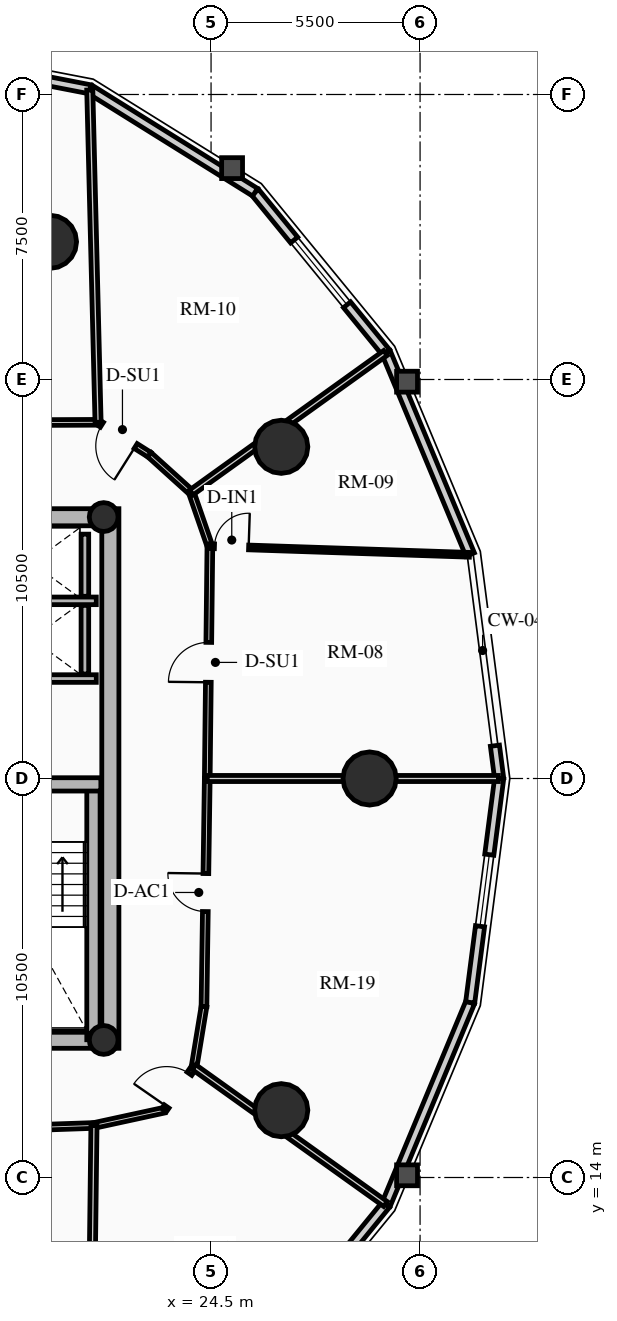
"""IFC4 building model, lengths in metres.
Left out: names, types, materials, properties, quantities, classifications, styles, units other than length and angle.
Written with IfcOpenShell. Run it as: python <this file> out.ifc"""

import sys

from ifc_helpers import new_model, si_unit, direction, frame, frame_2d, origin, origin_2d, place, context, subcontext, project, spatial, rectangle, circle, hollow_circle, extrude, source, transform, mapped, element, fill, save


model = new_model("IFC4")
c1 = context("Model", 3, precision=1e-05, world=origin(), true_north=direction((0.0, 1.0)))
c2 = subcontext(c1, "Body", "Model", "MODEL_VIEW")
j1 = project(units=[si_unit("LENGTHUNIT", "METRE"), si_unit("PLANEANGLEUNIT", "RADIAN")], contexts=[c1])
p1 = place(None, origin())
s1 = spatial("IfcSite", under=j1, at=p1, CompositionType="ELEMENT")
p2 = place(p1, origin())
s2 = spatial("IfcBuilding", under=s1, at=p2, CompositionType="ELEMENT")
p3 = place(p2, frame((0.0, 0.0, 81.79)))
s3 = spatial("IfcBuildingStorey", under=s2, at=p3, CompositionType="ELEMENT", Elevation=81.79)
p4 = place(p3, frame((21.85, 17.4, 0.0), z_axis=(0.0, 0.0, 1.0), x_axis=(0.0, 1.0, 0.0)))
e1 = element("IfcWall", 1, at=p4, inside=s3, PredefinedType="SHEAR", context=c2, shape_type="SweptSolid", body=[
    extrude(rectangle(XDim=14.2, YDim=0.45, at=frame_2d((7.1, 0.0))), origin(), (0.0, 0.0, 1.0), 2.91),
])
p5 = place(p3, frame((11.15, 17.625, 0.0), z_axis=(0.0, 0.0, 1.0), x_axis=(1.0, 0.0, 0.0)))
e2 = element("IfcWall", 2, at=p5, inside=s3, PredefinedType="SHEAR", context=c2, shape_type="SweptSolid", body=[
    extrude(rectangle(XDim=10.7, YDim=0.45, at=frame_2d((5.35, 0.0))), origin(), (0.0, 0.0, 1.0), 2.91),
])
m1 = source(origin(), c2, "Body", "SweptSolid", [
    extrude(rectangle(XDim=1.5, YDim=2.02, at=frame_2d((0.75, 1.01))), frame((0.0, 0.235, 0.0), z_axis=(0.0, -1.0, 0.0), x_axis=(1.0, 0.0, 0.0)), (0.0, 0.0, 1.0), 0.47),
])
p6 = place(p5, frame((5.45, 0.0, 0.0)))
e3 = element("IfcOpeningElement", 3, at=p6, cuts=e2, PredefinedType="OPENING", context=c2, shape_type="MappedRepresentation", body=[
    mapped(m1, transform((0.0, 0.0, 0.0), x_axis=(1.0, 0.0, 0.0), y_axis=(0.0, 1.0, 0.0), z_axis=(0.0, 0.0, 1.0), scale=1.0)),
])
p7 = place(p3, frame((11.15, 31.375, 0.0), z_axis=(0.0, 0.0, 1.0), x_axis=(1.0, 0.0, 0.0)))
e4 = element("IfcWall", 4, at=p7, inside=s3, PredefinedType="SHEAR", context=c2, shape_type="SweptSolid", body=[
    extrude(rectangle(XDim=10.7, YDim=0.45, at=frame_2d((5.35, 0.0))), origin(), (0.0, 0.0, 1.0), 2.91),
])
p8 = place(p7, frame((4.6, 0.0, 0.0)))
e5 = element("IfcOpeningElement", 5, at=p8, cuts=e4, PredefinedType="OPENING", context=c2, shape_type="MappedRepresentation", body=[
    mapped(m1, transform((0.0, 0.0, 0.0), x_axis=(1.0, 0.0, 0.0), y_axis=(0.0, 1.0, 0.0), z_axis=(0.0, 0.0, 1.0), scale=1.0)),
])
p9 = place(p3, frame((21.405, 17.625, 0.0), z_axis=(0.0, 0.0, 1.0), x_axis=(0.0, 1.0, 0.0)))
e6 = element("IfcWall", 6, at=p9, inside=s3, PredefinedType="SHEAR", context=c2, shape_type="SweptSolid", body=[
    extrude(rectangle(XDim=6.72, YDim=0.35, at=frame_2d((3.36, 0.0))), origin(), (0.0, 0.0, 1.0), 2.91),
])
p10 = place(p3, frame((18.315, 24.345, 0.0), z_axis=(0.0, 0.0, 1.0), x_axis=(1.0, 0.0, 0.0)))
e7 = element("IfcWall", 7, at=p10, inside=s3, PredefinedType="SHEAR", context=c2, shape_type="SweptSolid", body=[
    extrude(rectangle(XDim=3.285, YDim=0.35, at=frame_2d((1.643, 0.0))), origin(), (0.0, 0.0, 1.0), 2.91),
])
for number, where, z_axis, x_axis in (
    (8, (21.675, 17.62, 0.0), (0.0, 0.0, 1.0), (1.0, 0.0, 0.0)),
    (9, (21.675, 31.38, 0.0), (0.0, 0.0, 1.0), (1.0, 0.0, 0.0)),
):
    element("IfcColumn", number, at=place(p3, frame(where, z_axis=z_axis, x_axis=x_axis)), inside=s3, PredefinedType="COLUMN", context=c2, shape_type="SweptSolid", body=[
        extrude(hollow_circle(Radius=0.38, WallThickness=0.032, at=origin_2d()), origin(), (0.0, 0.0, 1.0), 2.91),
    ])
for number, where, z_axis, x_axis in (
    (10, (28.672, 24.5, 0.0), (0.0, 0.0, 1.0), (1.0, 0.0, 0.0)),
    (11, (26.347, 33.229, 0.0), (0.0, 0.0, 1.0), (1.0, 0.0, 0.0)),
    (12, (20.261, 38.623, 0.0), (0.0, 0.0, 1.0), (1.0, 0.0, 0.0)),
    (13, (26.347, 15.771, 0.0), (0.0, 0.0, 1.0), (1.0, 0.0, 0.0)),
):
    element("IfcColumn", number, at=place(p3, frame(where, z_axis=z_axis, x_axis=x_axis)), inside=s3, PredefinedType="USERDEFINED", context=c2, shape_type="SweptSolid", body=[
        extrude(circle(Radius=0.7, at=origin_2d()), origin(), (0.0, 0.0, 1.0), 2.91),
    ])
p11 = place(p3, frame((31.969, 25.363, 0.0), z_axis=(0.0, 0.0, 1.0), x_axis=(0.128523364007, -0.991706481225, 0.0)))
e14 = element("IfcWall", 14, at=p11, inside=s3, PredefinedType="SOLIDWALL", context=c2, shape_type="SweptSolid", body=[
    extrude(rectangle(XDim=0.87, YDim=0.24, at=frame_2d((0.435, 0.0))), origin(), (0.0, 0.0, 1.0), 2.655),
])
p12 = place(p3, frame((29.105, 35.709, 0.0), z_axis=(0.0, 0.0, 1.0), x_axis=(0.384344417632, -0.923189779317, 0.0)))
e15 = element("IfcWall", 15, at=p12, inside=s3, PredefinedType="SOLIDWALL", context=c2, shape_type="SweptSolid", body=[
    extrude(rectangle(XDim=5.758, YDim=0.24, at=frame_2d((2.879, 0.0))), origin(), (0.0, 0.0, 1.0), 2.179),
])
p13 = place(p3, frame((25.658, 39.928, 0.0), z_axis=(0.0, 0.0, 1.0), x_axis=(0.632700781152, -0.77439635945, 0.0)))
e16 = element("IfcWall", 16, at=p13, inside=s3, PredefinedType="SOLIDWALL", context=c2, shape_type="SweptSolid", body=[
    extrude(rectangle(XDim=5.448, YDim=0.24, at=frame_2d((2.724, 0.0))), origin(), (0.0, 0.0, 1.0), 2.179),
])
m2 = source(origin(), c2, "Body", "SweptSolid", [
    extrude(rectangle(XDim=2.2, YDim=1.35, at=frame_2d((1.1, 0.675))), frame((0.0, 0.13, 0.0), z_axis=(0.0, -1.0, 0.0), x_axis=(1.0, 0.0, 0.0)), (0.0, 0.0, 1.0), 0.26),
])
p14 = place(p13, frame((1.624, 0.0, 0.65)))
e17 = element("IfcOpeningElement", 17, at=p14, cuts=e16, PredefinedType="OPENING", context=c2, shape_type="MappedRepresentation", body=[
    mapped(m2, transform((0.0, 0.0, 0.0), x_axis=(1.0, 0.0, 0.0), y_axis=(0.0, 1.0, 0.0), z_axis=(0.0, 0.0, 1.0), scale=1.0)),
])
p15 = place(p3, frame((21.315, 42.637, 0.0), z_axis=(0.0, 0.0, 1.0), x_axis=(0.848520380187, -0.529162701263, 0.0)))
e18 = element("IfcWall", 18, at=p15, inside=s3, PredefinedType="SOLIDWALL", context=c2, shape_type="SweptSolid", body=[
    extrude(rectangle(XDim=5.119, YDim=0.24, at=frame_2d((2.56, 0.0))), origin(), (0.0, 0.0, 1.0), 2.179),
])
p16 = place(p3, frame((16.5, 43.57, 0.0), z_axis=(0.0, 0.0, 1.0), x_axis=(0.981723785992, -0.190311344954, 0.0)))
e19 = element("IfcWall", 19, at=p16, inside=s3, PredefinedType="SOLIDWALL", context=c2, shape_type="SweptSolid", body=[
    extrude(rectangle(XDim=4.904, YDim=0.24, at=frame_2d((2.452, 0.0))), origin(), (0.0, 0.0, 1.0), 2.179),
])
m3 = source(origin(), c2, "Body", "SweptSolid", [
    extrude(rectangle(XDim=1.9, YDim=1.35, at=frame_2d((0.95, 0.675))), frame((0.0, 0.13, 0.0), z_axis=(0.0, -1.0, 0.0), x_axis=(1.0, 0.0, 0.0)), (0.0, 0.0, 1.0), 0.26),
])
p17 = place(p16, frame((1.502, 0.0, 0.65)))
e20 = element("IfcOpeningElement", 20, at=p17, cuts=e19, PredefinedType="OPENING", context=c2, shape_type="MappedRepresentation", body=[
    mapped(m3, transform((0.0, 0.0, 0.0), x_axis=(1.0, 0.0, 0.0), y_axis=(0.0, 1.0, 0.0), z_axis=(0.0, 0.0, 1.0), scale=1.0)),
])
p18 = place(p3, frame((29.105, 13.291, 0.0), z_axis=(0.0, 0.0, 1.0), x_axis=(-0.632700781152, -0.77439635945, 0.0)))
e21 = element("IfcWall", 21, at=p18, inside=s3, PredefinedType="SOLIDWALL", context=c2, shape_type="SweptSolid", body=[
    extrude(rectangle(XDim=5.448, YDim=0.24, at=frame_2d((2.724, 0.0))), origin(), (0.0, 0.0, 1.0), 2.179),
])
p19 = place(p18, frame((1.624, 0.0, 0.65)))
e22 = element("IfcOpeningElement", 22, at=p19, cuts=e21, PredefinedType="OPENING", context=c2, shape_type="MappedRepresentation", body=[
    mapped(m2, transform((0.0, 0.0, 0.0), x_axis=(1.0, 0.0, 0.0), y_axis=(0.0, 1.0, 0.0), z_axis=(0.0, 0.0, 1.0), scale=1.0)),
])
p20 = place(p3, frame((31.318, 18.607, 0.0), z_axis=(0.0, 0.0, 1.0), x_axis=(-0.384344417632, -0.923189779317, 0.0)))
e23 = element("IfcWall", 23, at=p20, inside=s3, PredefinedType="SOLIDWALL", context=c2, shape_type="SweptSolid", body=[
    extrude(rectangle(XDim=5.758, YDim=0.24, at=frame_2d((2.879, 0.0))), origin(), (0.0, 0.0, 1.0), 2.179),
])
p21 = place(p3, frame((32.081, 24.5, 0.0), z_axis=(0.0, 0.0, 1.0), x_axis=(-0.128351991996, -0.991728675672, 0.0)))
e24 = element("IfcWall", 24, at=p21, inside=s3, PredefinedType="SOLIDWALL", context=c2, shape_type="SweptSolid", body=[
    extrude(rectangle(XDim=5.942, YDim=0.24, at=frame_2d((2.971, 0.0))), origin(), (0.0, 0.0, 1.0), 2.179),
])
p22 = place(p21, frame((2.021, 0.0, 0.65)))
e25 = element("IfcOpeningElement", 25, at=p22, cuts=e24, PredefinedType="OPENING", context=c2, shape_type="MappedRepresentation", body=[
    mapped(m3, transform((0.0, 0.0, 0.0), x_axis=(1.0, 0.0, 0.0), y_axis=(0.0, 1.0, 0.0), z_axis=(0.0, 0.0, 1.0), scale=1.0)),
])
for number, where, z_axis, x_axis in (
    (26, (18.51, 27.13, 0.0), (0.0, 0.0, 1.0), (1.0, 0.0, 0.0)),
    (27, (18.51, 29.175, 0.0), (0.0, 0.0, 1.0), (1.0, 0.0, 0.0)),
):
    element("IfcWall", number, at=place(p3, frame(where, z_axis=z_axis, x_axis=x_axis)), inside=s3, PredefinedType="SHEAR", context=c2, shape_type="SweptSolid", body=[
        extrude(rectangle(XDim=2.97, YDim=0.2, at=frame_2d((1.485, 0.0))), origin(), (0.0, 0.0, 1.0), 2.91),
    ])
p23 = place(p3, frame((21.18, 27.25, 0.0), z_axis=(0.0, 0.0, 1.0), x_axis=(0.0, 1.0, 0.0)))
e28 = element("IfcWall", 28, at=p23, inside=s3, PredefinedType="SHEAR", context=c2, shape_type="SweptSolid", body=[
    extrude(rectangle(XDim=1.805, YDim=0.2, at=frame_2d((0.902, 0.0))), origin(), (0.0, 0.0, 1.0), 2.91),
])
p24 = place(p3, frame((21.18, 29.295, 0.0), z_axis=(0.0, 0.0, 1.0), x_axis=(0.0, 1.0, 0.0)))
e29 = element("IfcWall", 29, at=p24, inside=s3, PredefinedType="SHEAR", context=c2, shape_type="SweptSolid", body=[
    extrude(rectangle(XDim=1.635, YDim=0.2, at=frame_2d((0.817, 0.0))), origin(), (0.0, 0.0, 1.0), 2.91),
])
p25 = place(p3, frame((24.4, 24.5, 0.0), z_axis=(0.0, 0.0, 1.0), x_axis=(0.011299841544, 0.999936154752, 0.0)))
e30 = element("IfcWall", 30, at=p25, inside=s3, PredefinedType="PARTITIONING", context=c2, shape_type="SweptSolid", body=[
    extrude(rectangle(XDim=6.115, YDim=0.15, at=frame_2d((3.057, 0.0))), origin(), (0.0, 0.0, 1.0), 2.225),
])
m4 = source(origin(), c2, "Body", "SweptSolid", [
    extrude(rectangle(XDim=1.05, YDim=2.015, at=frame_2d((0.525, 1.007))), frame((0.0, 0.085, 0.0), z_axis=(0.0, -1.0, 0.0), x_axis=(1.0, 0.0, 0.0)), (0.0, 0.0, 1.0), 0.17),
])
p26 = place(p25, frame((2.532, 0.0, 0.0)))
e31 = element("IfcOpeningElement", 31, at=p26, cuts=e30, PredefinedType="OPENING", context=c2, shape_type="MappedRepresentation", body=[
    mapped(m4, transform((0.0, 0.0, 0.0), x_axis=(1.0, 0.0, 0.0), y_axis=(0.0, 1.0, 0.0), z_axis=(0.0, 0.0, 1.0), scale=1.0)),
])
p27 = place(p3, frame((24.469, 30.614, 0.0), z_axis=(0.0, 0.0, 1.0), x_axis=(-0.327228335485, 0.944945298129, 0.0)))
e32 = element("IfcWall", 32, at=p27, inside=s3, PredefinedType="PARTITIONING", context=c2, shape_type="SweptSolid", body=[
    extrude(rectangle(XDim=1.495, YDim=0.15, at=frame_2d((0.748, 0.0))), origin(), (0.0, 0.0, 1.0), 2.225),
])
p28 = place(p3, frame((23.98, 32.027, 0.0), z_axis=(0.0, 0.0, 1.0), x_axis=(-0.742353224332, 0.670008724065, 0.0)))
e33 = element("IfcWall", 33, at=p28, inside=s3, PredefinedType="PARTITIONING", context=c2, shape_type="SweptSolid", body=[
    extrude(rectangle(XDim=1.485, YDim=0.15, at=frame_2d((0.742, 0.0))), origin(), (0.0, 0.0, 1.0), 2.225),
])
p29 = place(p3, frame((22.877, 33.022, 0.0), z_axis=(0.0, 0.0, 1.0), x_axis=(-0.845895608855, 0.533348496689, 0.0)))
e34 = element("IfcWall", 34, at=p29, inside=s3, PredefinedType="PARTITIONING", context=c2, shape_type="SweptSolid", body=[
    extrude(rectangle(XDim=1.597, YDim=0.15, at=frame_2d((0.798, 0.0))), origin(), (0.0, 0.0, 1.0), 2.225),
])
p30 = place(p29, frame((0.427, 0.0, 0.0)))
e35 = element("IfcOpeningElement", 35, at=p30, cuts=e34, PredefinedType="OPENING", context=c2, shape_type="MappedRepresentation", body=[
    mapped(m4, transform((0.0, 0.0, 0.0), x_axis=(1.0, 0.0, 0.0), y_axis=(0.0, 1.0, 0.0), z_axis=(0.0, 0.0, 1.0), scale=1.0)),
])
p31 = place(p3, frame((21.527, 33.873, 0.0), z_axis=(0.0, 0.0, 1.0), x_axis=(-0.999991838845, -0.004040079574, 0.0)))
e36 = element("IfcWall", 36, at=p31, inside=s3, PredefinedType="PARTITIONING", context=c2, shape_type="SweptSolid", body=[
    extrude(rectangle(XDim=3.384, YDim=0.15, at=frame_2d((1.692, 0.0))), origin(), (0.0, 0.0, 1.0), 2.225),
])
p32 = place(p3, frame((14.781, 15.141, 0.0), z_axis=(0.0, 0.0, 1.0), x_axis=(0.999407918707, 0.034406569513, 0.0)))
e37 = element("IfcWall", 37, at=p32, inside=s3, PredefinedType="PARTITIONING", context=c2, shape_type="SweptSolid", body=[
    extrude(rectangle(XDim=6.642, YDim=0.15, at=frame_2d((3.321, 0.0))), origin(), (0.0, 0.0, 1.0), 2.225),
])
p33 = place(p32, frame((2.796, 0.0, 0.0)))
e38 = element("IfcOpeningElement", 38, at=p33, cuts=e37, PredefinedType="OPENING", context=c2, shape_type="MappedRepresentation", body=[
    mapped(m4, transform((0.0, 0.0, 0.0), x_axis=(1.0, 0.0, 0.0), y_axis=(0.0, 1.0, 0.0), z_axis=(0.0, 0.0, 1.0), scale=1.0)),
])
p34 = place(p3, frame((21.419, 15.369, 0.0), z_axis=(0.0, 0.0, 1.0), x_axis=(0.977192701953, 0.212354475464, 0.0)))
e39 = element("IfcWall", 39, at=p34, inside=s3, PredefinedType="PARTITIONING", context=c2, shape_type="SweptSolid", body=[
    extrude(rectangle(XDim=1.888, YDim=0.15, at=frame_2d((0.944, 0.0))), origin(), (0.0, 0.0, 1.0), 2.225),
])
p35 = place(p3, frame((23.263, 15.77, 0.0), z_axis=(0.0, 0.0, 1.0), x_axis=(0.570743456919, 0.821128434768, 0.0)))
e40 = element("IfcWall", 40, at=p35, inside=s3, PredefinedType="PARTITIONING", context=c2, shape_type="SweptSolid", body=[
    extrude(rectangle(XDim=1.382, YDim=0.15, at=frame_2d((0.691, 0.0))), origin(), (0.0, 0.0, 1.0), 2.225),
])
p36 = place(p35, frame((0.12, 0.0, 0.0)))
e41 = element("IfcOpeningElement", 41, at=p36, cuts=e40, PredefinedType="OPENING", context=c2, shape_type="MappedRepresentation", body=[
    mapped(m4, transform((0.0, 0.0, 0.0), x_axis=(1.0, 0.0, 0.0), y_axis=(0.0, 1.0, 0.0), z_axis=(0.0, 0.0, 1.0), scale=1.0)),
])
p37 = place(p3, frame((24.052, 16.905, 0.0), z_axis=(0.0, 0.0, 1.0), x_axis=(0.162091534225, 0.986775726562, 0.0)))
e42 = element("IfcWall", 42, at=p37, inside=s3, PredefinedType="PARTITIONING", context=c2, shape_type="SweptSolid", body=[
    extrude(rectangle(XDim=1.613, YDim=0.15, at=frame_2d((0.807, 0.0))), origin(), (0.0, 0.0, 1.0), 2.225),
])
p38 = place(p3, frame((24.313, 18.496, 0.0), z_axis=(0.0, 0.0, 1.0), x_axis=(0.014394019188, 0.999896400739, 0.0)))
e43 = element("IfcWall", 43, at=p38, inside=s3, PredefinedType="PARTITIONING", context=c2, shape_type="SweptSolid", body=[
    extrude(rectangle(XDim=6.004, YDim=0.15, at=frame_2d((3.002, 0.0))), origin(), (0.0, 0.0, 1.0), 2.655),
])
m5 = source(origin(), c2, "Body", "SweptSolid", [
    extrude(rectangle(XDim=1.0, YDim=2.015, at=frame_2d((0.5, 1.007))), frame((0.0, 0.085, 0.0), z_axis=(0.0, -1.0, 0.0), x_axis=(1.0, 0.0, 0.0)), (0.0, 0.0, 1.0), 0.17),
])
p39 = place(p38, frame((2.502, 0.0, 0.0)))
e44 = element("IfcOpeningElement", 44, at=p39, cuts=e43, PredefinedType="OPENING", context=c2, shape_type="MappedRepresentation", body=[
    mapped(m5, transform((0.0, 0.0, 0.0), x_axis=(1.0, 0.0, 0.0), y_axis=(0.0, 1.0, 0.0), z_axis=(0.0, 0.0, 1.0), scale=1.0)),
])
p40 = place(p3, frame((24.4, 24.5, 0.0), z_axis=(0.0, 0.0, 1.0), x_axis=(1.0, 0.0, 0.0)))
e45 = element("IfcWall", 45, at=p40, inside=s3, PredefinedType="PARTITIONING", context=c2, shape_type="SweptSolid", body=[
    extrude(rectangle(XDim=7.661, YDim=0.16, at=frame_2d((3.831, 0.0))), origin(), (0.0, 0.0, 1.0), 2.179),
])
p41 = place(p3, frame((23.98, 32.027, 0.0), z_axis=(0.0, 0.0, 1.0), x_axis=(0.812162479031, 0.58343132214, 0.0)))
e46 = element("IfcWall", 46, at=p41, inside=s3, PredefinedType="PARTITIONING", context=c2, shape_type="SweptSolid", body=[
    extrude(rectangle(XDim=6.291, YDim=0.16, at=frame_2d((3.146, 0.0))), origin(), (0.0, 0.0, 1.0), 2.179),
])
p42 = place(p3, frame((21.527, 33.873, 0.0), z_axis=(0.0, 0.0, 1.0), x_axis=(-0.024952442794, 0.999688639327, 0.0)))
e47 = element("IfcWall", 47, at=p42, inside=s3, PredefinedType="PARTITIONING", context=c2, shape_type="SweptSolid", body=[
    extrude(rectangle(XDim=8.747, YDim=0.16, at=frame_2d((4.374, 0.0))), origin(), (0.0, 0.0, 1.0), 2.179),
])
p43 = place(p3, frame((21.419, 15.369, 0.0), z_axis=(0.0, 0.0, 1.0), x_axis=(-0.012251185903, -0.999924951406, 0.0)))
e48 = element("IfcWall", 48, at=p43, inside=s3, PredefinedType="PARTITIONING", context=c2, shape_type="SweptSolid", body=[
    extrude(rectangle(XDim=8.988, YDim=0.16, at=frame_2d((4.494, 0.0))), origin(), (0.0, 0.0, 1.0), 2.179),
])
p44 = place(p3, frame((24.052, 16.905, 0.0), z_axis=(0.0, 0.0, 1.0), x_axis=(0.813437670746, -0.581652091727, 0.0)))
e49 = element("IfcWall", 49, at=p44, inside=s3, PredefinedType="PARTITIONING", context=c2, shape_type="SweptSolid", body=[
    extrude(rectangle(XDim=6.192, YDim=0.16, at=frame_2d((3.096, 0.0))), origin(), (0.0, 0.0, 1.0), 2.179),
])
p45 = place(p3, frame((24.469, 30.614, 0.0), z_axis=(0.0, 0.0, 1.0), x_axis=(0.999446768925, -0.033258924898, 0.0)))
e50 = element("IfcWall", 50, at=p45, inside=s3, PredefinedType="PARTITIONING", context=c2, shape_type="SweptSolid", body=[
    extrude(rectangle(XDim=6.834, YDim=0.125, at=frame_2d((3.417, 0.0))), origin(), (0.0, 0.0, 1.0), 2.179),
])
m6 = source(origin(), c2, "Body", "SweptSolid", [
    extrude(rectangle(XDim=0.9, YDim=2.005, at=frame_2d((0.45, 1.002))), frame((0.0, 0.073, 0.0), z_axis=(0.0, -1.0, 0.0), x_axis=(1.0, 0.0, 0.0)), (0.0, 0.0, 1.0), 0.145),
])
p46 = place(p45, frame((0.12, 0.0, 0.0)))
e51 = element("IfcOpeningElement", 51, at=p46, cuts=e50, PredefinedType="OPENING", context=c2, shape_type="MappedRepresentation", body=[
    mapped(m6, transform((0.0, 0.0, 0.0), x_axis=(1.0, 0.0, 0.0), y_axis=(0.0, 1.0, 0.0), z_axis=(0.0, 0.0, 1.0), scale=1.0)),
])
m7 = source(origin(), c2, "Body", "SweptSolid", [
    extrude(rectangle(XDim=2.2, YDim=1.35, at=frame_2d((1.1, 0.675))), frame((0.0, 0.03, 0.0), z_axis=(0.0, -1.0, 0.0), x_axis=(1.0, 0.0, 0.0)), (0.0, 0.0, 1.0), 0.06),
])
p47 = place(p14, origin())
e52 = element("IfcWindow", 52, at=p47, inside=s3, PartitioningType="DOUBLE_PANEL_VERTICAL", PredefinedType="WINDOW", context=c2, shape_type="MappedRepresentation", body=[
    mapped(m7, transform((0.0, 0.0, 0.0), x_axis=(1.0, 0.0, 0.0), y_axis=(0.0, 1.0, 0.0), z_axis=(0.0, 0.0, 1.0), scale=1.0)),
])
fill(e17, e52)
m8 = source(origin(), c2, "Body", "SweptSolid", [
    extrude(rectangle(XDim=1.9, YDim=1.35, at=frame_2d((0.95, 0.675))), frame((0.0, 0.03, 0.0), z_axis=(0.0, -1.0, 0.0), x_axis=(1.0, 0.0, 0.0)), (0.0, 0.0, 1.0), 0.06),
])
p48 = place(p22, origin())
e53 = element("IfcWindow", 53, at=p48, inside=s3, PartitioningType="DOUBLE_PANEL_VERTICAL", PredefinedType="WINDOW", context=c2, shape_type="MappedRepresentation", body=[
    mapped(m8, transform((0.0, 0.0, 0.0), x_axis=(1.0, 0.0, 0.0), y_axis=(0.0, 1.0, 0.0), z_axis=(0.0, 0.0, 1.0), scale=1.0)),
])
fill(e25, e53)
m9 = source(origin(), c2, "Body", "SweptSolid", [
    extrude(rectangle(XDim=1.05, YDim=2.015, at=frame_2d((0.525, 1.007))), frame((0.0, 0.025, 0.0), z_axis=(0.0, -1.0, 0.0), x_axis=(1.0, 0.0, 0.0)), (0.0, 0.0, 1.0), 0.05),
])
p49 = place(p26, origin())
e54 = element("IfcDoor", 54, at=p49, inside=s3, OperationType="SINGLE_SWING_LEFT", PredefinedType="DOOR", context=c2, shape_type="MappedRepresentation", body=[
    mapped(m9, transform((0.0, 0.0, 0.0), x_axis=(1.0, 0.0, 0.0), y_axis=(0.0, 1.0, 0.0), z_axis=(0.0, 0.0, 1.0), scale=1.0)),
])
fill(e31, e54)
m10 = source(origin(), c2, "Body", "SweptSolid", [
    extrude(rectangle(XDim=0.9, YDim=2.005, at=frame_2d((0.45, 1.002))), frame((0.0, 0.025, 0.0), z_axis=(0.0, -1.0, 0.0), x_axis=(1.0, 0.0, 0.0)), (0.0, 0.0, 1.0), 0.05),
])
p50 = place(p46, origin())
e55 = element("IfcDoor", 55, at=p50, inside=s3, OperationType="SINGLE_SWING_RIGHT", PredefinedType="DOOR", context=c2, shape_type="MappedRepresentation", body=[
    mapped(m10, transform((0.0, 0.0, 0.0), x_axis=(1.0, 0.0, 0.0), y_axis=(0.0, 1.0, 0.0), z_axis=(0.0, 0.0, 1.0), scale=1.0)),
])
fill(e51, e55)
p51 = place(p30, origin())
e56 = element("IfcDoor", 56, at=p51, inside=s3, OperationType="SINGLE_SWING_LEFT", PredefinedType="DOOR", context=c2, shape_type="MappedRepresentation", body=[
    mapped(m9, transform((0.0, 0.0, 0.0), x_axis=(1.0, 0.0, 0.0), y_axis=(0.0, 1.0, 0.0), z_axis=(0.0, 0.0, 1.0), scale=1.0)),
])
fill(e35, e56)
p52 = place(p36, origin())
e57 = element("IfcDoor", 57, at=p52, inside=s3, OperationType="SINGLE_SWING_LEFT", PredefinedType="DOOR", context=c2, shape_type="MappedRepresentation", body=[
    mapped(m9, transform((0.0, 0.0, 0.0), x_axis=(1.0, 0.0, 0.0), y_axis=(0.0, 1.0, 0.0), z_axis=(0.0, 0.0, 1.0), scale=1.0)),
])
fill(e41, e57)
m11 = source(origin(), c2, "Body", "SweptSolid", [
    extrude(rectangle(XDim=1.0, YDim=2.015, at=frame_2d((0.5, 1.007))), frame((0.0, 0.025, 0.0), z_axis=(0.0, -1.0, 0.0), x_axis=(1.0, 0.0, 0.0)), (0.0, 0.0, 1.0), 0.05),
])
p53 = place(p39, origin())
e58 = element("IfcDoor", 58, at=p53, inside=s3, OperationType="SINGLE_SWING_RIGHT", PredefinedType="DOOR", context=c2, shape_type="MappedRepresentation", body=[
    mapped(m11, transform((0.0, 0.0, 0.0), x_axis=(1.0, 0.0, 0.0), y_axis=(0.0, 1.0, 0.0), z_axis=(0.0, 0.0, 1.0), scale=1.0)),
])
fill(e44, e58)
save(model, sys.argv[1])
